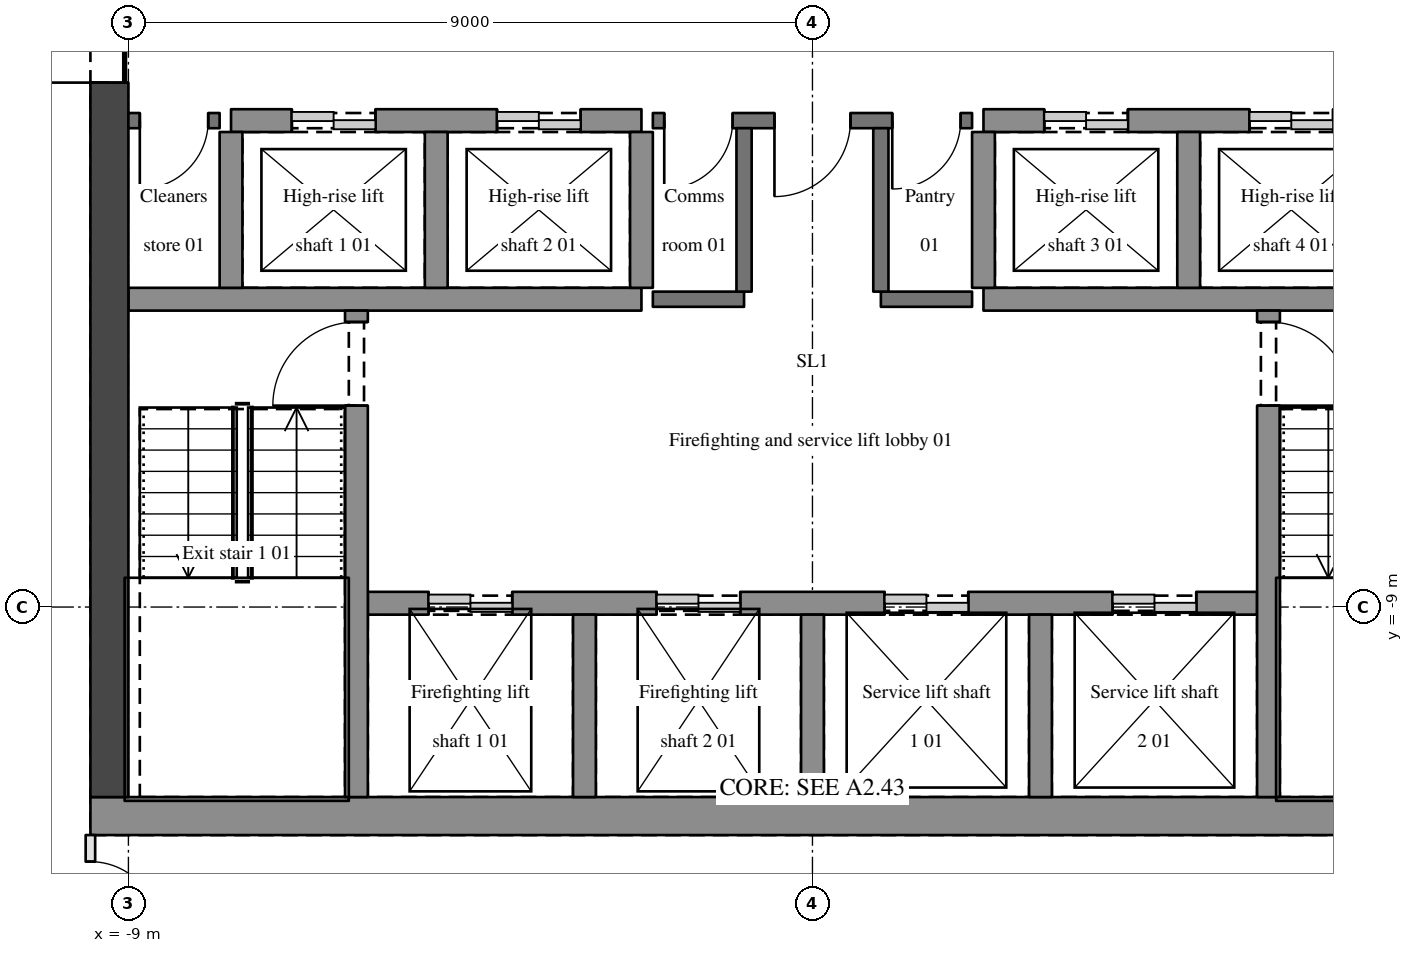
"""IFC4 building model, lengths in metres.
Left out: names, types, materials, properties, quantities, classifications, styles, units other than length and angle.
Written with IfcOpenShell. Run it as: python <this file> out.ifc"""

import sys

from ifc_helpers import new_model, si_unit, direction, frame, frame_2d, origin, place, context, subcontext, project, spatial, rectangle, extrude, element, fill, save


model = new_model("IFC4")
c1 = context("Model", 3, precision=1e-05, world=origin(), true_north=direction((0.0, 1.0)))
c2 = subcontext(c1, "Body", "Model", "MODEL_VIEW")
j1 = project(units=[si_unit("LENGTHUNIT", "METRE"), si_unit("PLANEANGLEUNIT", "RADIAN")], contexts=[c1])
p1 = place(None, origin())
s1 = spatial("IfcSite", under=j1, at=p1, CompositionType="ELEMENT")
p2 = place(p1, origin())
s2 = spatial("IfcBuilding", under=s1, at=p2, CompositionType="ELEMENT")
p3 = place(p2, frame((0.0, 0.0, 294.15)))
s3 = spatial("IfcBuildingStorey", under=s2, at=p3, CompositionType="ELEMENT", Elevation=294.15)
p4 = place(p3, frame((-9.5, -11.75, 0.0), z_axis=(0.0, 0.0, 1.0), x_axis=(1.0, 0.0, 0.0)))
e1 = element("IfcWall", 1, at=p4, inside=s3, PredefinedType="SHEAR", context=c2, shape_type="SweptSolid", body=[
    extrude(rectangle(XDim=19.0, YDim=0.5, at=frame_2d((9.5, 0.0))), origin(), (0.0, 0.0, 1.0), 3.15),
])
p5 = place(p3, frame((-9.25, -11.5, 0.0), z_axis=(0.0, 0.0, 1.0), x_axis=(0.0, 1.0, 0.0)))
e2 = element("IfcWall", 2, at=p5, inside=s3, PredefinedType="SHEAR", context=c2, shape_type="SweptSolid", body=[
    extrude(rectangle(XDim=11.65, YDim=0.5, at=frame_2d((5.825, 0.0))), origin(), (0.0, 0.0, 1.0), 3.15),
])
p6 = place(p5, frame((9.4, 0.0, 0.0)))
e3 = element("IfcOpeningElement", 3, at=p6, cuts=e2, PredefinedType="OPENING", context=c2, shape_type="SweptSolid", body=[
    extrude(rectangle(XDim=1.8, YDim=2.1, at=frame_2d((0.9, 1.05))), frame((0.0, 0.26, 0.0), z_axis=(0.0, -1.0, 0.0), x_axis=(1.0, 0.0, 0.0)), (0.0, 0.0, 1.0), 0.52),
])
p7 = place(p3, frame((-5.85, -8.95, 0.0), z_axis=(0.0, 0.0, 1.0), x_axis=(1.0, 0.0, 0.0)))
e4 = element("IfcWall", 4, at=p7, inside=s3, PredefinedType="SHEAR", context=c2, shape_type="SweptSolid", body=[
    extrude(rectangle(XDim=11.7, YDim=0.3, at=frame_2d((5.85, 0.0))), origin(), (0.0, 0.0, 1.0), 3.15),
])
p8 = place(p7, frame((0.8, 0.0, 0.0)))
e5 = element("IfcOpeningElement", 5, at=p8, cuts=e4, PredefinedType="OPENING", context=c2, shape_type="SweptSolid", body=[
    extrude(rectangle(XDim=1.1, YDim=2.1, at=frame_2d((0.55, 1.05))), frame((0.0, 0.16, 0.0), z_axis=(0.0, -1.0, 0.0), x_axis=(1.0, 0.0, 0.0)), (0.0, 0.0, 1.0), 0.32),
])
p9 = place(p7, frame((3.8, 0.0, 0.0)))
e6 = element("IfcOpeningElement", 6, at=p9, cuts=e4, PredefinedType="OPENING", context=c2, shape_type="SweptSolid", body=[
    extrude(rectangle(XDim=1.1, YDim=2.1, at=frame_2d((0.55, 1.05))), frame((0.0, 0.16, 0.0), z_axis=(0.0, -1.0, 0.0), x_axis=(1.0, 0.0, 0.0)), (0.0, 0.0, 1.0), 0.32),
])
p10 = place(p7, frame((6.8, 0.0, 0.0)))
e7 = element("IfcOpeningElement", 7, at=p10, cuts=e4, PredefinedType="OPENING", context=c2, shape_type="SweptSolid", body=[
    extrude(rectangle(XDim=1.1, YDim=2.1, at=frame_2d((0.55, 1.05))), frame((0.0, 0.16, 0.0), z_axis=(0.0, -1.0, 0.0), x_axis=(1.0, 0.0, 0.0)), (0.0, 0.0, 1.0), 0.32),
])
p11 = place(p7, frame((9.8, 0.0, 0.0)))
e8 = element("IfcOpeningElement", 8, at=p11, cuts=e4, PredefinedType="OPENING", context=c2, shape_type="SweptSolid", body=[
    extrude(rectangle(XDim=1.1, YDim=2.1, at=frame_2d((0.55, 1.05))), frame((0.0, 0.16, 0.0), z_axis=(0.0, -1.0, 0.0), x_axis=(1.0, 0.0, 0.0)), (0.0, 0.0, 1.0), 0.32),
])
p12 = place(p3, frame((-9.0, -4.95, 0.0), z_axis=(0.0, 0.0, 1.0), x_axis=(1.0, 0.0, 0.0)))
e9 = element("IfcWall", 9, at=p12, inside=s3, PredefinedType="SHEAR", context=c2, shape_type="SweptSolid", body=[
    extrude(rectangle(XDim=6.75, YDim=0.3, at=frame_2d((3.375, 0.0))), origin(), (0.0, 0.0, 1.0), 3.15),
])
for number, where, z_axis, x_axis in (
    (10, (-2.1, -4.95, 0.0), (0.0, 0.0, 1.0), (1.0, 0.0, 0.0)),
    (11, (0.9, -4.95, 0.0), (0.0, 0.0, 1.0), (1.0, 0.0, 0.0)),
):
    element("IfcWall", number, at=place(p3, frame(where, z_axis=z_axis, x_axis=x_axis)), inside=s3, PredefinedType="SOLIDWALL", context=c2, shape_type="SweptSolid", body=[
        extrude(rectangle(XDim=1.2, YDim=0.2, at=frame_2d((0.6, 0.0))), origin(), (0.0, 0.0, 1.0), 2.85),
    ])
p13 = place(p3, frame((2.25, -4.95, 0.0), z_axis=(0.0, 0.0, 1.0), x_axis=(1.0, 0.0, 0.0)))
e12 = element("IfcWall", 12, at=p13, inside=s3, PredefinedType="SHEAR", context=c2, shape_type="SweptSolid", body=[
    extrude(rectangle(XDim=6.75, YDim=0.3, at=frame_2d((3.375, 0.0))), origin(), (0.0, 0.0, 1.0), 3.15),
])
p14 = place(p3, frame((-7.8, -2.6, 0.0), z_axis=(0.0, 0.0, 1.0), x_axis=(-1.0, 0.0, 0.0)))
e13 = element("IfcWall", 13, at=p14, inside=s3, PredefinedType="SOLIDWALL", context=c2, shape_type="SweptSolid", body=[
    extrude(rectangle(XDim=1.2, YDim=0.2, at=frame_2d((0.6, 0.0))), origin(), (0.0, 0.0, 1.0), 2.85),
])
p15 = place(p14, frame((0.15, 0.0, 0.0)))
e14 = element("IfcOpeningElement", 14, at=p15, cuts=e13, PredefinedType="OPENING", context=c2, shape_type="SweptSolid", body=[
    extrude(rectangle(XDim=0.9, YDim=2.1, at=frame_2d((0.45, 1.05))), frame((0.0, 0.11, 0.0), z_axis=(0.0, -1.0, 0.0), x_axis=(1.0, 0.0, 0.0)), (0.0, 0.0, 1.0), 0.22),
])
p16 = place(p3, frame((-7.65, -2.6, 0.0), z_axis=(0.0, 0.0, 1.0), x_axis=(1.0, 0.0, 0.0)))
e15 = element("IfcWall", 15, at=p16, inside=s3, PredefinedType="SHEAR", context=c2, shape_type="SweptSolid", body=[
    extrude(rectangle(XDim=5.4, YDim=0.3, at=frame_2d((2.7, 0.0))), origin(), (0.0, 0.0, 1.0), 3.15),
])
p17 = place(p16, frame((0.8, 0.0, 0.0)))
e16 = element("IfcOpeningElement", 16, at=p17, cuts=e15, PredefinedType="OPENING", context=c2, shape_type="SweptSolid", body=[
    extrude(rectangle(XDim=1.1, YDim=2.1, at=frame_2d((0.55, 1.05))), frame((0.0, 0.16, 0.0), z_axis=(0.0, -1.0, 0.0), x_axis=(1.0, 0.0, 0.0)), (0.0, 0.0, 1.0), 0.32),
])
p18 = place(p16, frame((3.5, 0.0, 0.0)))
e17 = element("IfcOpeningElement", 17, at=p18, cuts=e15, PredefinedType="OPENING", context=c2, shape_type="SweptSolid", body=[
    extrude(rectangle(XDim=1.1, YDim=2.1, at=frame_2d((0.55, 1.05))), frame((0.0, 0.16, 0.0), z_axis=(0.0, -1.0, 0.0), x_axis=(1.0, 0.0, 0.0)), (0.0, 0.0, 1.0), 0.32),
])
p19 = place(p3, frame((2.1, -2.6, 0.0), z_axis=(0.0, 0.0, 1.0), x_axis=(-1.0, 0.0, 0.0)))
e18 = element("IfcWall", 18, at=p19, inside=s3, PredefinedType="SOLIDWALL", context=c2, shape_type="SweptSolid", body=[
    extrude(rectangle(XDim=4.2, YDim=0.2, at=frame_2d((2.1, 0.0))), origin(), (0.0, 0.0, 1.0), 2.85),
])
p20 = place(p19, frame((1.6, 0.0, 0.0)))
e19 = element("IfcOpeningElement", 19, at=p20, cuts=e18, PredefinedType="OPENING", context=c2, shape_type="SweptSolid", body=[
    extrude(rectangle(XDim=1.0, YDim=2.1, at=frame_2d((0.5, 1.05))), frame((0.0, 0.11, 0.0), z_axis=(0.0, -1.0, 0.0), x_axis=(1.0, 0.0, 0.0)), (0.0, 0.0, 1.0), 0.22),
])
p21 = place(p19, frame((3.15, 0.0, 0.0)))
e20 = element("IfcOpeningElement", 20, at=p21, cuts=e18, PredefinedType="OPENING", context=c2, shape_type="SweptSolid", body=[
    extrude(rectangle(XDim=0.9, YDim=2.1, at=frame_2d((0.45, 1.05))), frame((0.0, 0.11, 0.0), z_axis=(0.0, -1.0, 0.0), x_axis=(1.0, 0.0, 0.0)), (0.0, 0.0, 1.0), 0.22),
])
p22 = place(p19, frame((0.15, 0.0, 0.0)))
e21 = element("IfcOpeningElement", 21, at=p22, cuts=e18, PredefinedType="OPENING", context=c2, shape_type="SweptSolid", body=[
    extrude(rectangle(XDim=0.9, YDim=2.1, at=frame_2d((0.45, 1.05))), frame((0.0, 0.11, 0.0), z_axis=(0.0, -1.0, 0.0), x_axis=(1.0, 0.0, 0.0)), (0.0, 0.0, 1.0), 0.22),
])
p23 = place(p3, frame((2.25, -2.6, 0.0), z_axis=(0.0, 0.0, 1.0), x_axis=(1.0, 0.0, 0.0)))
e22 = element("IfcWall", 22, at=p23, inside=s3, PredefinedType="SHEAR", context=c2, shape_type="SweptSolid", body=[
    extrude(rectangle(XDim=5.4, YDim=0.3, at=frame_2d((2.7, 0.0))), origin(), (0.0, 0.0, 1.0), 3.15),
])
p24 = place(p23, frame((0.8, 0.0, 0.0)))
e23 = element("IfcOpeningElement", 23, at=p24, cuts=e22, PredefinedType="OPENING", context=c2, shape_type="SweptSolid", body=[
    extrude(rectangle(XDim=1.1, YDim=2.1, at=frame_2d((0.55, 1.05))), frame((0.0, 0.16, 0.0), z_axis=(0.0, -1.0, 0.0), x_axis=(1.0, 0.0, 0.0)), (0.0, 0.0, 1.0), 0.32),
])
p25 = place(p23, frame((3.5, 0.0, 0.0)))
e24 = element("IfcOpeningElement", 24, at=p25, cuts=e22, PredefinedType="OPENING", context=c2, shape_type="SweptSolid", body=[
    extrude(rectangle(XDim=1.1, YDim=2.1, at=frame_2d((0.55, 1.05))), frame((0.0, 0.16, 0.0), z_axis=(0.0, -1.0, 0.0), x_axis=(1.0, 0.0, 0.0)), (0.0, 0.0, 1.0), 0.32),
])
p26 = place(p3, frame((-9.5, -12.0, 0.0), z_axis=(0.0, 0.0, 1.0), x_axis=(0.0, -1.0, 0.0)))
e25 = element("IfcWall", 25, at=p26, inside=s3, PredefinedType="PARTITIONING", context=c2, shape_type="SweptSolid", body=[
    extrude(rectangle(XDim=1.876, YDim=0.125, at=frame_2d((0.938, 0.0))), origin(), (0.0, 0.0, 1.0), 2.21),
])
p27 = place(p26, frame((0.35, 0.0, 0.0)))
e26 = element("IfcOpeningElement", 26, at=p27, cuts=e25, PredefinedType="OPENING", context=c2, shape_type="SweptSolid", body=[
    extrude(rectangle(XDim=0.9, YDim=2.1, at=frame_2d((0.45, 1.05))), frame((0.0, 0.073, 0.0), z_axis=(0.0, -1.0, 0.0), x_axis=(1.0, 0.0, 0.0)), (0.0, 0.0, 1.0), 0.145),
])
p28 = place(p3, frame((-7.65, -4.8, 0.0), z_axis=(0.0, 0.0, 1.0), x_axis=(0.0, 1.0, 0.0)))
e27 = element("IfcWall", 27, at=p28, inside=s3, PredefinedType="SHEAR", context=c2, shape_type="SweptSolid", body=[
    extrude(rectangle(XDim=2.05, YDim=0.3, at=frame_2d((1.025, 0.0))), origin(), (0.0, 0.0, 1.0), 3.15),
])
p29 = place(p3, frame((-6.0, -11.5, 0.0), z_axis=(0.0, 0.0, 1.0), x_axis=(0.0, 1.0, 0.0)))
e28 = element("IfcWall", 28, at=p29, inside=s3, PredefinedType="SHEAR", context=c2, shape_type="SweptSolid", body=[
    extrude(rectangle(XDim=6.4, YDim=0.3, at=frame_2d((3.2, 0.0))), origin(), (0.0, 0.0, 1.0), 3.15),
])
p30 = place(p29, frame((5.15, 0.0, 0.0)))
e29 = element("IfcOpeningElement", 29, at=p30, cuts=e28, PredefinedType="OPENING", context=c2, shape_type="SweptSolid", body=[
    extrude(rectangle(XDim=1.1, YDim=2.1, at=frame_2d((0.55, 1.05))), frame((0.0, 0.16, 0.0), z_axis=(0.0, -1.0, 0.0), x_axis=(1.0, 0.0, 0.0)), (0.0, 0.0, 1.0), 0.32),
])
p31 = place(p3, frame((-4.95, -4.8, 0.0), z_axis=(0.0, 0.0, 1.0), x_axis=(0.0, 1.0, 0.0)))
e30 = element("IfcWall", 30, at=p31, inside=s3, PredefinedType="SHEAR", context=c2, shape_type="SweptSolid", body=[
    extrude(rectangle(XDim=2.05, YDim=0.3, at=frame_2d((1.025, 0.0))), origin(), (0.0, 0.0, 1.0), 3.15),
])
p32 = place(p3, frame((-3.0, -11.5, 0.0), z_axis=(0.0, 0.0, 1.0), x_axis=(0.0, 1.0, 0.0)))
e31 = element("IfcWall", 31, at=p32, inside=s3, PredefinedType="SHEAR", context=c2, shape_type="SweptSolid", body=[
    extrude(rectangle(XDim=2.4, YDim=0.3, at=frame_2d((1.2, 0.0))), origin(), (0.0, 0.0, 1.0), 3.15),
])
p33 = place(p3, frame((-2.25, -4.8, 0.0), z_axis=(0.0, 0.0, 1.0), x_axis=(0.0, 1.0, 0.0)))
e32 = element("IfcWall", 32, at=p33, inside=s3, PredefinedType="SHEAR", context=c2, shape_type="SweptSolid", body=[
    extrude(rectangle(XDim=2.05, YDim=0.3, at=frame_2d((1.025, 0.0))), origin(), (0.0, 0.0, 1.0), 3.15),
])
p34 = place(p3, frame((-0.9, -4.85, 0.0), z_axis=(0.0, 0.0, 1.0), x_axis=(0.0, 1.0, 0.0)))
e33 = element("IfcWall", 33, at=p34, inside=s3, PredefinedType="SOLIDWALL", context=c2, shape_type="SweptSolid", body=[
    extrude(rectangle(XDim=2.15, YDim=0.2, at=frame_2d((1.075, 0.0))), origin(), (0.0, 0.0, 1.0), 2.85),
])
p35 = place(p3, frame((0.0, -11.5, 0.0), z_axis=(0.0, 0.0, 1.0), x_axis=(0.0, 1.0, 0.0)))
e34 = element("IfcWall", 34, at=p35, inside=s3, PredefinedType="SHEAR", context=c2, shape_type="SweptSolid", body=[
    extrude(rectangle(XDim=2.4, YDim=0.3, at=frame_2d((1.2, 0.0))), origin(), (0.0, 0.0, 1.0), 3.15),
])
p36 = place(p3, frame((0.9, -4.85, 0.0), z_axis=(0.0, 0.0, 1.0), x_axis=(0.0, 1.0, 0.0)))
e35 = element("IfcWall", 35, at=p36, inside=s3, PredefinedType="SOLIDWALL", context=c2, shape_type="SweptSolid", body=[
    extrude(rectangle(XDim=2.15, YDim=0.2, at=frame_2d((1.075, 0.0))), origin(), (0.0, 0.0, 1.0), 2.85),
])
p37 = place(p3, frame((2.25, -4.8, 0.0), z_axis=(0.0, 0.0, 1.0), x_axis=(0.0, 1.0, 0.0)))
e36 = element("IfcWall", 36, at=p37, inside=s3, PredefinedType="SHEAR", context=c2, shape_type="SweptSolid", body=[
    extrude(rectangle(XDim=2.05, YDim=0.3, at=frame_2d((1.025, 0.0))), origin(), (0.0, 0.0, 1.0), 3.15),
])
p38 = place(p3, frame((3.0, -11.5, 0.0), z_axis=(0.0, 0.0, 1.0), x_axis=(0.0, 1.0, 0.0)))
e37 = element("IfcWall", 37, at=p38, inside=s3, PredefinedType="SHEAR", context=c2, shape_type="SweptSolid", body=[
    extrude(rectangle(XDim=2.4, YDim=0.3, at=frame_2d((1.2, 0.0))), origin(), (0.0, 0.0, 1.0), 3.15),
])
p39 = place(p3, frame((4.95, -4.8, 0.0), z_axis=(0.0, 0.0, 1.0), x_axis=(0.0, 1.0, 0.0)))
e38 = element("IfcWall", 38, at=p39, inside=s3, PredefinedType="SHEAR", context=c2, shape_type="SweptSolid", body=[
    extrude(rectangle(XDim=2.05, YDim=0.3, at=frame_2d((1.025, 0.0))), origin(), (0.0, 0.0, 1.0), 3.15),
])
p40 = place(p3, frame((6.0, -5.1, 0.0), z_axis=(0.0, 0.0, 1.0), x_axis=(0.0, -1.0, 0.0)))
e39 = element("IfcWall", 39, at=p40, inside=s3, PredefinedType="SHEAR", context=c2, shape_type="SweptSolid", body=[
    extrude(rectangle(XDim=6.4, YDim=0.3, at=frame_2d((3.2, 0.0))), origin(), (0.0, 0.0, 1.0), 3.15),
])
p41 = place(p40, frame((0.15, 0.0, 0.0)))
e40 = element("IfcOpeningElement", 40, at=p41, cuts=e39, PredefinedType="OPENING", context=c2, shape_type="SweptSolid", body=[
    extrude(rectangle(XDim=1.1, YDim=2.1, at=frame_2d((0.55, 1.05))), frame((0.0, 0.16, 0.0), z_axis=(0.0, -1.0, 0.0), x_axis=(1.0, 0.0, 0.0)), (0.0, 0.0, 1.0), 0.32),
])
p42 = place(p6, origin())
e41 = element("IfcDoor", 41, at=p42, inside=s3, OperationType="DOUBLE_DOOR_SINGLE_SWING", PredefinedType="DOOR", context=c2, shape_type="SweptSolid", body=[
    extrude(rectangle(XDim=1.8, YDim=2.1, at=frame_2d((0.9, 1.05))), frame((0.0, 0.025, 0.0), z_axis=(0.0, -1.0, 0.0), x_axis=(1.0, 0.0, 0.0)), (0.0, 0.0, 1.0), 0.05),
])
fill(e3, e41)
p43 = place(p20, origin())
e42 = element("IfcDoor", 42, at=p43, inside=s3, OperationType="SINGLE_SWING_RIGHT", PredefinedType="DOOR", context=c2, shape_type="SweptSolid", body=[
    extrude(rectangle(XDim=1.0, YDim=2.1, at=frame_2d((0.5, 1.05))), frame((0.0, 0.025, 0.0), z_axis=(0.0, -1.0, 0.0), x_axis=(1.0, 0.0, 0.0)), (0.0, 0.0, 1.0), 0.05),
])
fill(e19, e42)
p44 = place(p30, origin())
e43 = element("IfcDoor", 43, at=p44, inside=s3, OperationType="SINGLE_SWING_LEFT", PredefinedType="DOOR", context=c2, shape_type="SweptSolid", body=[
    extrude(rectangle(XDim=1.1, YDim=2.1, at=frame_2d((0.55, 1.05))), frame((0.0, 0.025, 0.0), z_axis=(0.0, -1.0, 0.0), x_axis=(1.0, 0.0, 0.0)), (0.0, 0.0, 1.0), 0.05),
])
fill(e29, e43)
p45 = place(p41, origin())
e44 = element("IfcDoor", 44, at=p45, inside=s3, OperationType="SINGLE_SWING_RIGHT", PredefinedType="DOOR", context=c2, shape_type="SweptSolid", body=[
    extrude(rectangle(XDim=1.1, YDim=2.1, at=frame_2d((0.55, 1.05))), frame((0.0, 0.025, 0.0), z_axis=(0.0, -1.0, 0.0), x_axis=(1.0, 0.0, 0.0)), (0.0, 0.0, 1.0), 0.05),
])
fill(e40, e44)
p46 = place(p21, origin())
e45 = element("IfcDoor", 45, at=p46, inside=s3, OperationType="SINGLE_SWING_RIGHT", PredefinedType="DOOR", context=c2, shape_type="SweptSolid", body=[
    extrude(rectangle(XDim=0.9, YDim=2.1, at=frame_2d((0.45, 1.05))), frame((0.0, 0.025, 0.0), z_axis=(0.0, -1.0, 0.0), x_axis=(1.0, 0.0, 0.0)), (0.0, 0.0, 1.0), 0.05),
])
fill(e20, e45)
p47 = place(p22, origin())
e46 = element("IfcDoor", 46, at=p47, inside=s3, OperationType="SINGLE_SWING_RIGHT", PredefinedType="DOOR", context=c2, shape_type="SweptSolid", body=[
    extrude(rectangle(XDim=0.9, YDim=2.1, at=frame_2d((0.45, 1.05))), frame((0.0, 0.025, 0.0), z_axis=(0.0, -1.0, 0.0), x_axis=(1.0, 0.0, 0.0)), (0.0, 0.0, 1.0), 0.05),
])
fill(e21, e46)
p48 = place(p15, origin())
e47 = element("IfcDoor", 47, at=p48, inside=s3, OperationType="SINGLE_SWING_RIGHT", PredefinedType="DOOR", context=c2, shape_type="SweptSolid", body=[
    extrude(rectangle(XDim=0.9, YDim=2.1, at=frame_2d((0.45, 1.05))), frame((0.0, 0.025, 0.0), z_axis=(0.0, -1.0, 0.0), x_axis=(1.0, 0.0, 0.0)), (0.0, 0.0, 1.0), 0.05),
])
fill(e14, e47)
p49 = place(p27, origin())
e48 = element("IfcDoor", 48, at=p49, inside=s3, OperationType="SINGLE_SWING_RIGHT", PredefinedType="DOOR", context=c2, shape_type="SweptSolid", body=[
    extrude(rectangle(XDim=0.9, YDim=2.1, at=frame_2d((0.45, 1.05))), frame((0.0, 0.025, 0.0), z_axis=(0.0, -1.0, 0.0), x_axis=(1.0, 0.0, 0.0)), (0.0, 0.0, 1.0), 0.05),
])
fill(e26, e48)
p50 = place(p8, origin())
e49 = element("IfcDoor", 49, at=p50, inside=s3, OperationType="DOUBLE_DOOR_SLIDING", PredefinedType="DOOR", context=c2, shape_type="SweptSolid", body=[
    extrude(rectangle(XDim=1.1, YDim=2.1, at=frame_2d((0.55, 1.05))), frame((0.0, 0.025, 0.0), z_axis=(0.0, -1.0, 0.0), x_axis=(1.0, 0.0, 0.0)), (0.0, 0.0, 1.0), 0.05),
])
fill(e5, e49)
p51 = place(p9, origin())
e50 = element("IfcDoor", 50, at=p51, inside=s3, OperationType="DOUBLE_DOOR_SLIDING", PredefinedType="DOOR", context=c2, shape_type="SweptSolid", body=[
    extrude(rectangle(XDim=1.1, YDim=2.1, at=frame_2d((0.55, 1.05))), frame((0.0, 0.025, 0.0), z_axis=(0.0, -1.0, 0.0), x_axis=(1.0, 0.0, 0.0)), (0.0, 0.0, 1.0), 0.05),
])
fill(e6, e50)
p52 = place(p17, origin())
e51 = element("IfcDoor", 51, at=p52, inside=s3, OperationType="DOUBLE_DOOR_SLIDING", PredefinedType="DOOR", context=c2, shape_type="SweptSolid", body=[
    extrude(rectangle(XDim=1.1, YDim=2.1, at=frame_2d((0.55, 1.05))), frame((0.0, 0.025, 0.0), z_axis=(0.0, -1.0, 0.0), x_axis=(1.0, 0.0, 0.0)), (0.0, 0.0, 1.0), 0.05),
])
fill(e16, e51)
p53 = place(p18, origin())
e52 = element("IfcDoor", 52, at=p53, inside=s3, OperationType="DOUBLE_DOOR_SLIDING", PredefinedType="DOOR", context=c2, shape_type="SweptSolid", body=[
    extrude(rectangle(XDim=1.1, YDim=2.1, at=frame_2d((0.55, 1.05))), frame((0.0, 0.025, 0.0), z_axis=(0.0, -1.0, 0.0), x_axis=(1.0, 0.0, 0.0)), (0.0, 0.0, 1.0), 0.05),
])
fill(e17, e52)
p54 = place(p24, origin())
e53 = element("IfcDoor", 53, at=p54, inside=s3, OperationType="DOUBLE_DOOR_SLIDING", PredefinedType="DOOR", context=c2, shape_type="SweptSolid", body=[
    extrude(rectangle(XDim=1.1, YDim=2.1, at=frame_2d((0.55, 1.05))), frame((0.0, 0.025, 0.0), z_axis=(0.0, -1.0, 0.0), x_axis=(1.0, 0.0, 0.0)), (0.0, 0.0, 1.0), 0.05),
])
fill(e23, e53)
p55 = place(p25, origin())
e54 = element("IfcDoor", 54, at=p55, inside=s3, OperationType="DOUBLE_DOOR_SLIDING", PredefinedType="DOOR", context=c2, shape_type="SweptSolid", body=[
    extrude(rectangle(XDim=1.1, YDim=2.1, at=frame_2d((0.55, 1.05))), frame((0.0, 0.025, 0.0), z_axis=(0.0, -1.0, 0.0), x_axis=(1.0, 0.0, 0.0)), (0.0, 0.0, 1.0), 0.05),
])
fill(e24, e54)
p56 = place(p10, origin())
e55 = element("IfcDoor", 55, at=p56, inside=s3, OperationType="DOUBLE_DOOR_SLIDING", PredefinedType="DOOR", context=c2, shape_type="SweptSolid", body=[
    extrude(rectangle(XDim=1.1, YDim=2.1, at=frame_2d((0.55, 1.05))), frame((0.0, 0.025, 0.0), z_axis=(0.0, -1.0, 0.0), x_axis=(1.0, 0.0, 0.0)), (0.0, 0.0, 1.0), 0.05),
])
fill(e7, e55)
p57 = place(p11, origin())
e56 = element("IfcDoor", 56, at=p57, inside=s3, OperationType="DOUBLE_DOOR_SLIDING", PredefinedType="DOOR", context=c2, shape_type="SweptSolid", body=[
    extrude(rectangle(XDim=1.1, YDim=2.1, at=frame_2d((0.55, 1.05))), frame((0.0, 0.025, 0.0), z_axis=(0.0, -1.0, 0.0), x_axis=(1.0, 0.0, 0.0)), (0.0, 0.0, 1.0), 0.05),
])
fill(e8, e56)
save(model, sys.argv[1])
